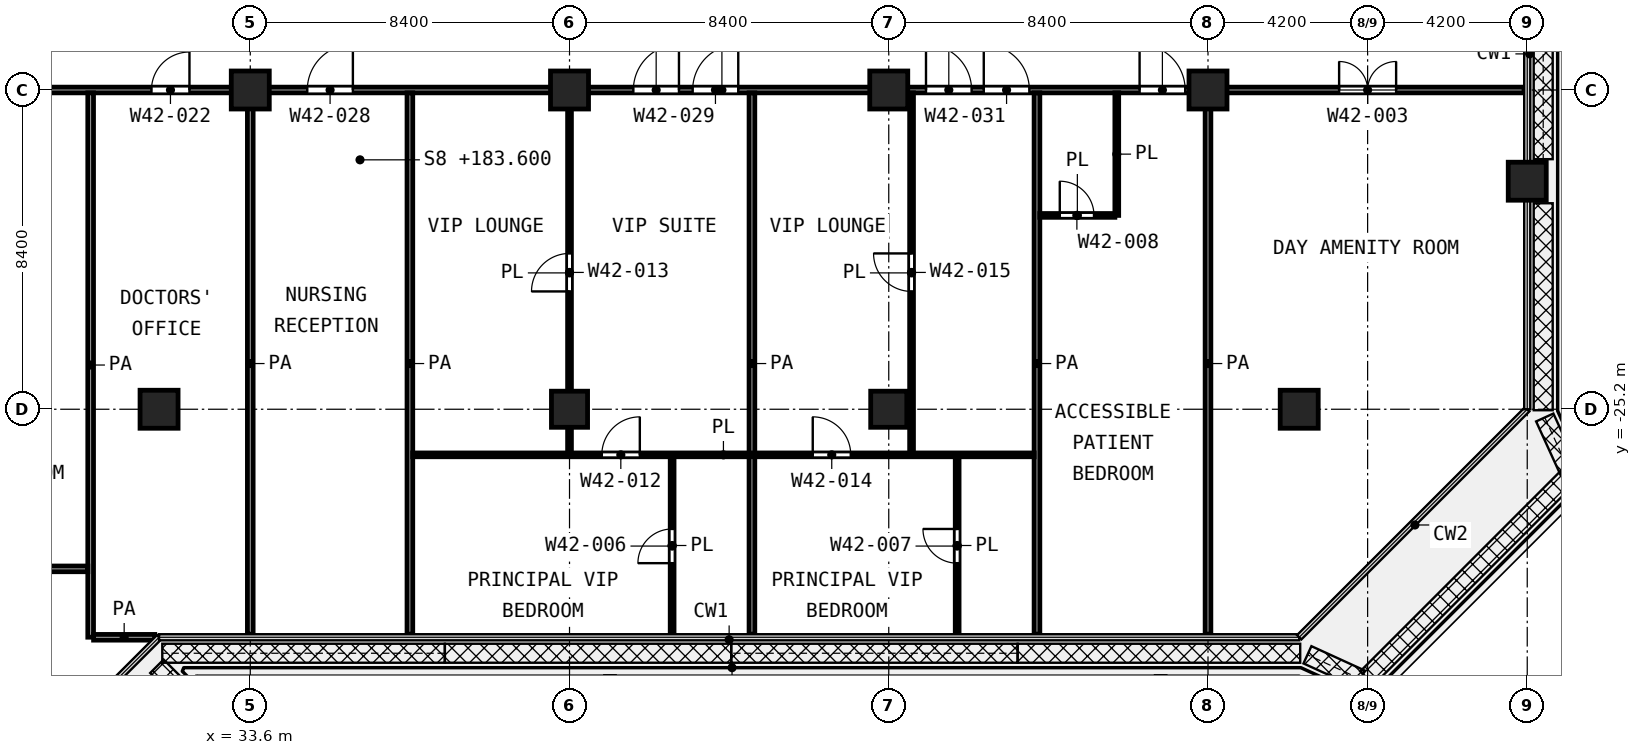
"""IFC4 building model, lengths in metres.
Left out: names, types, materials, properties, quantities, classifications, styles, units other than length and angle.
Written with IfcOpenShell. Run it as: python <this file> out.ifc"""

import sys

from ifc_helpers import new_model, si_unit, direction, frame, frame_2d, origin, origin_2d, place, context, subcontext, project, spatial, rectangle, extrude, element, fill, save


model = new_model("IFC4")
c1 = context("Model", 3, precision=1e-05, world=origin(), true_north=direction((0.0, 1.0)))
c2 = subcontext(c1, "Body", "Model", "MODEL_VIEW")
j1 = project(units=[si_unit("LENGTHUNIT", "METRE"), si_unit("PLANEANGLEUNIT", "RADIAN")], contexts=[c1])
p1 = place(None, origin())
s1 = spatial("IfcSite", under=j1, at=p1, CompositionType="ELEMENT")
p2 = place(p1, origin())
s2 = spatial("IfcBuilding", under=s1, at=p2, CompositionType="ELEMENT")
p3 = place(p2, frame((0.0, 0.0, 183.6)))
s3 = spatial("IfcBuildingStorey", under=s2, at=p3, CompositionType="ELEMENT", Elevation=183.6)
for number, where, z_axis, x_axis in (
    (1, (33.6, -16.8, 0.0), (0.0, 0.0, 1.0), (1.0, 0.0, 0.0)),
    (2, (42.0, -16.8, 0.0), (0.0, 0.0, 1.0), (1.0, 0.0, 0.0)),
    (3, (50.4, -16.8, 0.0), (0.0, 0.0, 1.0), (1.0, 0.0, 0.0)),
    (4, (58.8, -16.8, 0.0), (0.0, 0.0, 1.0), (1.0, 0.0, 0.0)),
    (5, (67.2, -19.2, 0.0), (0.0, 0.0, 1.0), (1.0, 0.0, 0.0)),
    (6, (31.2, -25.2, 0.0), (0.0, 0.0, 1.0), (1.0, 0.0, 0.0)),
):
    element("IfcColumn", number, at=place(p3, frame(where, z_axis=z_axis, x_axis=x_axis)), inside=s3, PredefinedType="COLUMN", context=c2, shape_type="SweptSolid", body=[
        extrude(rectangle(XDim=1.0, YDim=1.0, at=origin_2d()), origin(), (0.0, 0.0, 1.0), 4.2),
    ])
for number, where, z_axis, x_axis in (
    (7, (42.0, -25.2, 0.0), (0.0, 0.0, 1.0), (1.0, 0.0, 0.0)),
    (8, (50.4, -25.2, 0.0), (0.0, 0.0, 1.0), (1.0, 0.0, 0.0)),
):
    element("IfcColumn", number, at=place(p3, frame(where, z_axis=z_axis, x_axis=x_axis)), inside=s3, PredefinedType="COLUMN", context=c2, shape_type="SweptSolid", body=[
        extrude(rectangle(XDim=0.95, YDim=0.95, at=origin_2d()), origin(), (0.0, 0.0, 1.0), 4.2),
    ])
p4 = place(p3, frame((61.2, -25.2, 0.0), z_axis=(0.0, 0.0, 1.0), x_axis=(1.0, 0.0, 0.0)))
e9 = element("IfcColumn", 9, at=p4, inside=s3, PredefinedType="COLUMN", context=c2, shape_type="SweptSolid", body=[
    extrude(rectangle(XDim=1.0, YDim=1.0, at=origin_2d()), origin(), (0.0, 0.0, 1.0), 4.2),
])
p5 = place(p3, frame((37.875, -26.4, 0.0), z_axis=(0.0, 0.0, 1.0), x_axis=(1.0, 0.0, 0.0)))
e10 = element("IfcWall", 10, at=p5, inside=s3, PredefinedType="PARTITIONING", context=c2, shape_type="SweptSolid", body=[
    extrude(rectangle(XDim=16.35, YDim=0.1, at=frame_2d((8.175, 0.0))), origin(), (0.0, 0.0, 1.0), 3.6),
])
p6 = place(p5, frame((4.975, 0.0, 0.0)))
e11 = element("IfcOpeningElement", 11, at=p6, cuts=e10, PredefinedType="OPENING", context=c2, shape_type="SweptSolid", body=[
    extrude(rectangle(XDim=1.0, YDim=2.1, at=frame_2d((0.5, 1.05))), frame((0.0, 0.06, 0.0), z_axis=(0.0, -1.0, 0.0), x_axis=(1.0, 0.0, 0.0)), (0.0, 0.0, 1.0), 0.12),
])
p7 = place(p5, frame((10.525, 0.0, 0.0)))
e12 = element("IfcOpeningElement", 12, at=p7, cuts=e10, PredefinedType="OPENING", context=c2, shape_type="SweptSolid", body=[
    extrude(rectangle(XDim=1.0, YDim=2.1, at=frame_2d((0.5, 1.05))), frame((0.0, 0.06, 0.0), z_axis=(0.0, -1.0, 0.0), x_axis=(1.0, 0.0, 0.0)), (0.0, 0.0, 1.0), 0.12),
])
p8 = place(p3, frame((54.375, -20.1, 0.0), z_axis=(0.0, 0.0, 1.0), x_axis=(1.0, 0.0, 0.0)))
e13 = element("IfcWall", 13, at=p8, inside=s3, PredefinedType="PARTITIONING", context=c2, shape_type="SweptSolid", body=[
    extrude(rectangle(XDim=1.975, YDim=0.1, at=frame_2d((0.988, 0.0))), origin(), (0.0, 0.0, 1.0), 3.6),
])
p9 = place(p8, frame((0.525, 0.0, 0.0)))
e14 = element("IfcOpeningElement", 14, at=p9, cuts=e13, PredefinedType="OPENING", context=c2, shape_type="SweptSolid", body=[
    extrude(rectangle(XDim=0.9, YDim=2.1, at=frame_2d((0.45, 1.05))), frame((0.0, 0.06, 0.0), z_axis=(0.0, -1.0, 0.0), x_axis=(1.0, 0.0, 0.0)), (0.0, 0.0, 1.0), 0.12),
])
p10 = place(p3, frame((42.0, -26.35, 0.0), z_axis=(0.0, 0.0, 1.0), x_axis=(0.0, 1.0, 0.0)))
e15 = element("IfcWall", 15, at=p10, inside=s3, PredefinedType="PARTITIONING", context=c2, shape_type="SweptSolid", body=[
    extrude(rectangle(XDim=9.475, YDim=0.1, at=frame_2d((4.738, 0.0))), origin(), (0.0, 0.0, 1.0), 3.6),
])
p11 = place(p10, frame((4.25, 0.0, 0.0)))
e16 = element("IfcOpeningElement", 16, at=p11, cuts=e15, PredefinedType="OPENING", context=c2, shape_type="SweptSolid", body=[
    extrude(rectangle(XDim=1.0, YDim=2.1, at=frame_2d((0.5, 1.05))), frame((0.0, 0.06, 0.0), z_axis=(0.0, -1.0, 0.0), x_axis=(1.0, 0.0, 0.0)), (0.0, 0.0, 1.0), 0.12),
])
p12 = place(p3, frame((44.7, -31.12, 0.0), z_axis=(0.0, 0.0, 1.0), x_axis=(0.0, 1.0, 0.0)))
e17 = element("IfcWall", 17, at=p12, inside=s3, PredefinedType="PARTITIONING", context=c2, shape_type="SweptSolid", body=[
    extrude(rectangle(XDim=4.67, YDim=0.1, at=frame_2d((2.335, 0.0))), origin(), (0.0, 0.0, 1.0), 3.6),
])
p13 = place(p12, frame((1.87, 0.0, 0.0)))
e18 = element("IfcOpeningElement", 18, at=p13, cuts=e17, PredefinedType="OPENING", context=c2, shape_type="SweptSolid", body=[
    extrude(rectangle(XDim=0.9, YDim=2.1, at=frame_2d((0.45, 1.05))), frame((0.0, 0.06, 0.0), z_axis=(0.0, -1.0, 0.0), x_axis=(1.0, 0.0, 0.0)), (0.0, 0.0, 1.0), 0.12),
])
p14 = place(p3, frame((51.0, -26.35, 0.0), z_axis=(0.0, 0.0, 1.0), x_axis=(0.0, 1.0, 0.0)))
e19 = element("IfcWall", 19, at=p14, inside=s3, PredefinedType="PARTITIONING", context=c2, shape_type="SweptSolid", body=[
    extrude(rectangle(XDim=9.475, YDim=0.1, at=frame_2d((4.738, 0.0))), origin(), (0.0, 0.0, 1.0), 3.6),
])
p15 = place(p14, frame((4.25, 0.0, 0.0)))
e20 = element("IfcOpeningElement", 20, at=p15, cuts=e19, PredefinedType="OPENING", context=c2, shape_type="SweptSolid", body=[
    extrude(rectangle(XDim=1.0, YDim=2.1, at=frame_2d((0.5, 1.05))), frame((0.0, 0.06, 0.0), z_axis=(0.0, -1.0, 0.0), x_axis=(1.0, 0.0, 0.0)), (0.0, 0.0, 1.0), 0.12),
])
p16 = place(p3, frame((52.2, -31.12, 0.0), z_axis=(0.0, 0.0, 1.0), x_axis=(0.0, 1.0, 0.0)))
e21 = element("IfcWall", 21, at=p16, inside=s3, PredefinedType="PARTITIONING", context=c2, shape_type="SweptSolid", body=[
    extrude(rectangle(XDim=4.67, YDim=0.1, at=frame_2d((2.335, 0.0))), origin(), (0.0, 0.0, 1.0), 3.6),
])
p17 = place(p16, frame((1.87, 0.0, 0.0)))
e22 = element("IfcOpeningElement", 22, at=p17, cuts=e21, PredefinedType="OPENING", context=c2, shape_type="SweptSolid", body=[
    extrude(rectangle(XDim=0.9, YDim=2.1, at=frame_2d((0.45, 1.05))), frame((0.0, 0.06, 0.0), z_axis=(0.0, -1.0, 0.0), x_axis=(1.0, 0.0, 0.0)), (0.0, 0.0, 1.0), 0.12),
])
p18 = place(p3, frame((56.4, -20.1, 0.0), z_axis=(0.0, 0.0, 1.0), x_axis=(0.0, 1.0, 0.0)))
e23 = element("IfcWall", 23, at=p18, inside=s3, PredefinedType="PARTITIONING", context=c2, shape_type="SweptSolid", body=[
    extrude(rectangle(XDim=3.225, YDim=0.1, at=frame_2d((1.613, 0.0))), origin(), (0.0, 0.0, 1.0), 3.6),
])
p19 = place(p3, frame((29.477, -31.2, 0.0), z_axis=(0.0, 0.0, 1.0), x_axis=(1.0, 0.0, 0.0)))
e24 = element("IfcWall", 24, at=p19, inside=s3, PredefinedType="PARTITIONING", context=c2, shape_type="SweptSolid", body=[
    extrude(rectangle(XDim=1.61, YDim=0.15, at=frame_2d((0.805, 0.0))), origin(), (0.0, 0.0, 1.0), 3.6),
])
p20 = place(p3, frame((16.875, -29.4, 0.0), z_axis=(0.0, 0.0, 1.0), x_axis=(1.0, 0.0, 0.0)))
e25 = element("IfcWall", 25, at=p20, inside=s3, PredefinedType="PARTITIONING", context=c2, shape_type="SweptSolid", body=[
    extrude(rectangle(XDim=12.45, YDim=0.15, at=frame_2d((6.225, 0.0))), origin(), (0.0, 0.0, 1.0), 3.6),
])
p21 = place(p3, frame((24.9, -16.8, 0.0), z_axis=(0.0, 0.0, 1.0), x_axis=(1.0, 0.0, 0.0)))
e26 = element("IfcWall", 26, at=p21, inside=s3, PredefinedType="PARTITIONING", context=c2, shape_type="SweptSolid", body=[
    extrude(rectangle(XDim=42.22, YDim=0.15, at=frame_2d((21.11, 0.0))), origin(), (0.0, 0.0, 1.0), 3.6),
])
p22 = place(p21, frame((1.65, 0.0, 0.0)))
e27 = element("IfcOpeningElement", 27, at=p22, cuts=e26, PredefinedType="OPENING", context=c2, shape_type="SweptSolid", body=[
    extrude(rectangle(XDim=1.5, YDim=2.1, at=frame_2d((0.75, 1.05))), frame((0.0, 0.085, 0.0), z_axis=(0.0, -1.0, 0.0), x_axis=(1.0, 0.0, 0.0)), (0.0, 0.0, 1.0), 0.17),
])
p23 = place(p21, frame((6.1, 0.0, 0.0)))
e28 = element("IfcOpeningElement", 28, at=p23, cuts=e26, PredefinedType="OPENING", context=c2, shape_type="SweptSolid", body=[
    extrude(rectangle(XDim=1.0, YDim=2.1, at=frame_2d((0.5, 1.05))), frame((0.0, 0.085, 0.0), z_axis=(0.0, -1.0, 0.0), x_axis=(1.0, 0.0, 0.0)), (0.0, 0.0, 1.0), 0.17),
])
p24 = place(p21, frame((10.2, 0.0, 0.0)))
e29 = element("IfcOpeningElement", 29, at=p24, cuts=e26, PredefinedType="OPENING", context=c2, shape_type="SweptSolid", body=[
    extrude(rectangle(XDim=1.2, YDim=2.1, at=frame_2d((0.6, 1.05))), frame((0.0, 0.085, 0.0), z_axis=(0.0, -1.0, 0.0), x_axis=(1.0, 0.0, 0.0)), (0.0, 0.0, 1.0), 0.17),
])
p25 = place(p21, frame((20.34, 0.0, 0.0)))
e30 = element("IfcOpeningElement", 30, at=p25, cuts=e26, PredefinedType="OPENING", context=c2, shape_type="SweptSolid", body=[
    extrude(rectangle(XDim=1.2, YDim=2.1, at=frame_2d((0.6, 1.05))), frame((0.0, 0.085, 0.0), z_axis=(0.0, -1.0, 0.0), x_axis=(1.0, 0.0, 0.0)), (0.0, 0.0, 1.0), 0.17),
])
p26 = place(p21, frame((18.78, 0.0, 0.0)))
e31 = element("IfcOpeningElement", 31, at=p26, cuts=e26, PredefinedType="OPENING", context=c2, shape_type="SweptSolid", body=[
    extrude(rectangle(XDim=1.2, YDim=2.1, at=frame_2d((0.6, 1.05))), frame((0.0, 0.085, 0.0), z_axis=(0.0, -1.0, 0.0), x_axis=(1.0, 0.0, 0.0)), (0.0, 0.0, 1.0), 0.17),
])
p27 = place(p21, frame((28.0, 0.0, 0.0)))
e32 = element("IfcOpeningElement", 32, at=p27, cuts=e26, PredefinedType="OPENING", context=c2, shape_type="SweptSolid", body=[
    extrude(rectangle(XDim=1.2, YDim=2.1, at=frame_2d((0.6, 1.05))), frame((0.0, 0.085, 0.0), z_axis=(0.0, -1.0, 0.0), x_axis=(1.0, 0.0, 0.0)), (0.0, 0.0, 1.0), 0.17),
])
p28 = place(p21, frame((26.48, 0.0, 0.0)))
e33 = element("IfcOpeningElement", 33, at=p28, cuts=e26, PredefinedType="OPENING", context=c2, shape_type="SweptSolid", body=[
    extrude(rectangle(XDim=1.2, YDim=2.1, at=frame_2d((0.6, 1.05))), frame((0.0, 0.085, 0.0), z_axis=(0.0, -1.0, 0.0), x_axis=(1.0, 0.0, 0.0)), (0.0, 0.0, 1.0), 0.17),
])
p29 = place(p21, frame((32.1, 0.0, 0.0)))
e34 = element("IfcOpeningElement", 34, at=p29, cuts=e26, PredefinedType="OPENING", context=c2, shape_type="SweptSolid", body=[
    extrude(rectangle(XDim=1.2, YDim=2.1, at=frame_2d((0.6, 1.05))), frame((0.0, 0.085, 0.0), z_axis=(0.0, -1.0, 0.0), x_axis=(1.0, 0.0, 0.0)), (0.0, 0.0, 1.0), 0.17),
])
p30 = place(p21, frame((37.35, 0.0, 0.0)))
e35 = element("IfcOpeningElement", 35, at=p30, cuts=e26, PredefinedType="OPENING", context=c2, shape_type="SweptSolid", body=[
    extrude(rectangle(XDim=1.5, YDim=2.1, at=frame_2d((0.75, 1.05))), frame((0.0, 0.085, 0.0), z_axis=(0.0, -1.0, 0.0), x_axis=(1.0, 0.0, 0.0)), (0.0, 0.0, 1.0), 0.17),
])
p31 = place(p3, frame((29.4, -31.198, 0.0), z_axis=(0.0, 0.0, 1.0), x_axis=(0.0, 1.0, 0.0)))
e36 = element("IfcWall", 36, at=p31, inside=s3, PredefinedType="PARTITIONING", context=c2, shape_type="SweptSolid", body=[
    extrude(rectangle(XDim=14.323, YDim=0.15, at=frame_2d((7.162, 0.0))), origin(), (0.0, 0.0, 1.0), 3.6),
])
for number, where, z_axis, x_axis in (
    (37, (33.6, -31.12, 0.0), (0.0, 0.0, 1.0), (0.0, 1.0, 0.0)),
    (38, (37.8, -31.12, 0.0), (0.0, 0.0, 1.0), (0.0, 1.0, 0.0)),
    (39, (46.8, -31.12, 0.0), (0.0, 0.0, 1.0), (0.0, 1.0, 0.0)),
    (40, (54.3, -31.12, 0.0), (0.0, 0.0, 1.0), (0.0, 1.0, 0.0)),
    (41, (58.8, -31.12, 0.0), (0.0, 0.0, 1.0), (0.0, 1.0, 0.0)),
):
    element("IfcWall", number, at=place(p3, frame(where, z_axis=z_axis, x_axis=x_axis)), inside=s3, PredefinedType="PARTITIONING", context=c2, shape_type="SweptSolid", body=[
        extrude(rectangle(XDim=14.245, YDim=0.15, at=frame_2d((7.123, 0.0))), origin(), (0.0, 0.0, 1.0), 3.6),
    ])
p32 = place(p23, origin())
e42 = element("IfcDoor", 42, at=p32, inside=s3, OperationType="SINGLE_SWING_RIGHT", PredefinedType="DOOR", context=c2, shape_type="SweptSolid", body=[
    extrude(rectangle(XDim=1.0, YDim=2.1, at=frame_2d((0.5, 1.05))), frame((0.0, 0.025, 0.0), z_axis=(0.0, -1.0, 0.0), x_axis=(1.0, 0.0, 0.0)), (0.0, 0.0, 1.0), 0.05),
])
fill(e28, e42)
p33 = place(p24, origin())
e43 = element("IfcDoor", 43, at=p33, inside=s3, OperationType="SINGLE_SWING_RIGHT", PredefinedType="DOOR", context=c2, shape_type="SweptSolid", body=[
    extrude(rectangle(XDim=1.2, YDim=2.1, at=frame_2d((0.6, 1.05))), frame((0.0, 0.025, 0.0), z_axis=(0.0, -1.0, 0.0), x_axis=(1.0, 0.0, 0.0)), (0.0, 0.0, 1.0), 0.05),
])
fill(e29, e43)
p34 = place(p25, origin())
e44 = element("IfcDoor", 44, at=p34, inside=s3, OperationType="SINGLE_SWING_RIGHT", PredefinedType="DOOR", context=c2, shape_type="SweptSolid", body=[
    extrude(rectangle(XDim=1.2, YDim=2.1, at=frame_2d((0.6, 1.05))), frame((0.0, 0.025, 0.0), z_axis=(0.0, -1.0, 0.0), x_axis=(1.0, 0.0, 0.0)), (0.0, 0.0, 1.0), 0.05),
])
fill(e30, e44)
p35 = place(p26, origin())
e45 = element("IfcDoor", 45, at=p35, inside=s3, OperationType="SINGLE_SWING_RIGHT", PredefinedType="DOOR", context=c2, shape_type="SweptSolid", body=[
    extrude(rectangle(XDim=1.2, YDim=2.1, at=frame_2d((0.6, 1.05))), frame((0.0, 0.025, 0.0), z_axis=(0.0, -1.0, 0.0), x_axis=(1.0, 0.0, 0.0)), (0.0, 0.0, 1.0), 0.05),
])
fill(e31, e45)
p36 = place(p6, origin())
e46 = element("IfcDoor", 46, at=p36, inside=s3, OperationType="SINGLE_SWING_RIGHT", PredefinedType="DOOR", context=c2, shape_type="SweptSolid", body=[
    extrude(rectangle(XDim=1.0, YDim=2.1, at=frame_2d((0.5, 1.05))), frame((0.0, 0.025, 0.0), z_axis=(0.0, -1.0, 0.0), x_axis=(1.0, 0.0, 0.0)), (0.0, 0.0, 1.0), 0.05),
])
fill(e11, e46)
p37 = place(p11, origin())
e47 = element("IfcDoor", 47, at=p37, inside=s3, OperationType="SINGLE_SWING_LEFT", PredefinedType="DOOR", context=c2, shape_type="SweptSolid", body=[
    extrude(rectangle(XDim=1.0, YDim=2.1, at=frame_2d((0.5, 1.05))), frame((0.0, 0.025, 0.0), z_axis=(0.0, -1.0, 0.0), x_axis=(1.0, 0.0, 0.0)), (0.0, 0.0, 1.0), 0.05),
])
fill(e16, e47)
p38 = place(p13, origin())
e48 = element("IfcDoor", 48, at=p38, inside=s3, OperationType="SINGLE_SWING_LEFT", PredefinedType="DOOR", context=c2, shape_type="SweptSolid", body=[
    extrude(rectangle(XDim=0.9, YDim=2.1, at=frame_2d((0.45, 1.05))), frame((0.0, 0.025, 0.0), z_axis=(0.0, -1.0, 0.0), x_axis=(1.0, 0.0, 0.0)), (0.0, 0.0, 1.0), 0.05),
])
fill(e18, e48)
p39 = place(p27, origin())
e49 = element("IfcDoor", 49, at=p39, inside=s3, OperationType="SINGLE_SWING_LEFT", PredefinedType="DOOR", context=c2, shape_type="SweptSolid", body=[
    extrude(rectangle(XDim=1.2, YDim=2.1, at=frame_2d((0.6, 1.05))), frame((0.0, 0.025, 0.0), z_axis=(0.0, -1.0, 0.0), x_axis=(1.0, 0.0, 0.0)), (0.0, 0.0, 1.0), 0.05),
])
fill(e32, e49)
p40 = place(p28, origin())
e50 = element("IfcDoor", 50, at=p40, inside=s3, OperationType="SINGLE_SWING_LEFT", PredefinedType="DOOR", context=c2, shape_type="SweptSolid", body=[
    extrude(rectangle(XDim=1.2, YDim=2.1, at=frame_2d((0.6, 1.05))), frame((0.0, 0.025, 0.0), z_axis=(0.0, -1.0, 0.0), x_axis=(1.0, 0.0, 0.0)), (0.0, 0.0, 1.0), 0.05),
])
fill(e33, e50)
p41 = place(p7, origin())
e51 = element("IfcDoor", 51, at=p41, inside=s3, OperationType="SINGLE_SWING_LEFT", PredefinedType="DOOR", context=c2, shape_type="SweptSolid", body=[
    extrude(rectangle(XDim=1.0, YDim=2.1, at=frame_2d((0.5, 1.05))), frame((0.0, 0.025, 0.0), z_axis=(0.0, -1.0, 0.0), x_axis=(1.0, 0.0, 0.0)), (0.0, 0.0, 1.0), 0.05),
])
fill(e12, e51)
p42 = place(p15, origin())
e52 = element("IfcDoor", 52, at=p42, inside=s3, OperationType="SINGLE_SWING_RIGHT", PredefinedType="DOOR", context=c2, shape_type="SweptSolid", body=[
    extrude(rectangle(XDim=1.0, YDim=2.1, at=frame_2d((0.5, 1.05))), frame((0.0, 0.025, 0.0), z_axis=(0.0, -1.0, 0.0), x_axis=(1.0, 0.0, 0.0)), (0.0, 0.0, 1.0), 0.05),
])
fill(e20, e52)
p43 = place(p17, origin())
e53 = element("IfcDoor", 53, at=p43, inside=s3, OperationType="SINGLE_SWING_RIGHT", PredefinedType="DOOR", context=c2, shape_type="SweptSolid", body=[
    extrude(rectangle(XDim=0.9, YDim=2.1, at=frame_2d((0.45, 1.05))), frame((0.0, 0.025, 0.0), z_axis=(0.0, -1.0, 0.0), x_axis=(1.0, 0.0, 0.0)), (0.0, 0.0, 1.0), 0.05),
])
fill(e22, e53)
p44 = place(p29, origin())
e54 = element("IfcDoor", 54, at=p44, inside=s3, OperationType="SINGLE_SWING_LEFT", PredefinedType="DOOR", context=c2, shape_type="SweptSolid", body=[
    extrude(rectangle(XDim=1.2, YDim=2.1, at=frame_2d((0.6, 1.05))), frame((0.0, 0.025, 0.0), z_axis=(0.0, -1.0, 0.0), x_axis=(1.0, 0.0, 0.0)), (0.0, 0.0, 1.0), 0.05),
])
fill(e34, e54)
p45 = place(p9, origin())
e55 = element("IfcDoor", 55, at=p45, inside=s3, OperationType="SINGLE_SWING_LEFT", PredefinedType="DOOR", context=c2, shape_type="SweptSolid", body=[
    extrude(rectangle(XDim=0.9, YDim=2.1, at=frame_2d((0.45, 1.05))), frame((0.0, 0.025, 0.0), z_axis=(0.0, -1.0, 0.0), x_axis=(1.0, 0.0, 0.0)), (0.0, 0.0, 1.0), 0.05),
])
fill(e14, e55)
p46 = place(p30, origin())
e56 = element("IfcDoor", 56, at=p46, inside=s3, OperationType="DOUBLE_DOOR_SINGLE_SWING", PredefinedType="DOOR", context=c2, shape_type="SweptSolid", body=[
    extrude(rectangle(XDim=1.5, YDim=2.1, at=frame_2d((0.75, 1.05))), frame((0.0, 0.025, 0.0), z_axis=(0.0, -1.0, 0.0), x_axis=(1.0, 0.0, 0.0)), (0.0, 0.0, 1.0), 0.05),
])
fill(e35, e56)
save(model, sys.argv[1])
